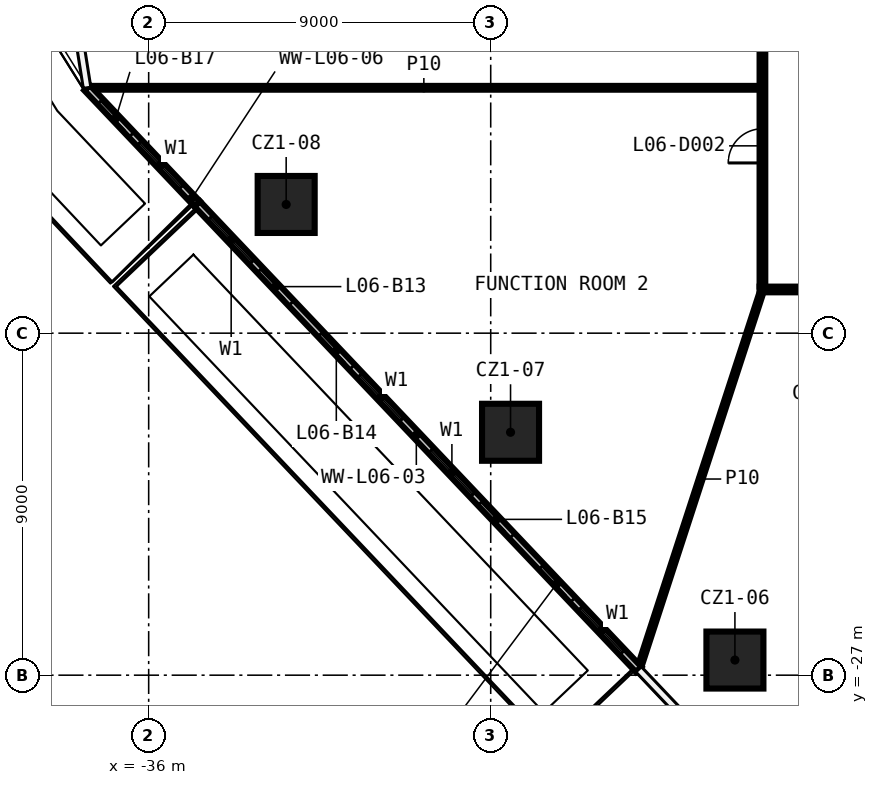
"""IFC4 building model, lengths in metres.
Left out: names, types, materials, properties, quantities, classifications, styles, units other than length and angle.
Written with IfcOpenShell. Run it as: python <this file> out.ifc"""

import sys

from ifc_helpers import new_model, si_unit, direction, frame, frame_2d, origin, origin_2d, place, context, subcontext, project, spatial, rectangle, extrude, element, fill, save


model = new_model("IFC4")
c1 = context("Model", 3, precision=1e-05, world=origin(), true_north=direction((0.0, 1.0)))
c2 = subcontext(c1, "Body", "Model", "MODEL_VIEW")
j1 = project(units=[si_unit("LENGTHUNIT", "METRE"), si_unit("PLANEANGLEUNIT", "RADIAN")], contexts=[c1])
p1 = place(None, origin())
s1 = spatial("IfcSite", under=j1, at=p1, CompositionType="ELEMENT")
p2 = place(p1, origin())
s2 = spatial("IfcBuilding", under=s1, at=p2, CompositionType="ELEMENT")
p3 = place(p2, frame((0.0, 0.0, 44.0)))
s3 = spatial("IfcBuildingStorey", under=s2, at=p3, CompositionType="ELEMENT", Elevation=44.0)
for number, where, z_axis, x_axis in (
    (1, (-20.574, -26.602, 0.0), (0.0, 0.0, 1.0), (1.0, 0.0, 0.0)),
    (2, (-26.478, -20.608, 0.0), (0.0, 0.0, 1.0), (1.0, 0.0, 0.0)),
    (3, (-32.382, -14.613, 0.0), (0.0, 0.0, 1.0), (1.0, 0.0, 0.0)),
):
    element("IfcColumn", number, at=place(p3, frame(where, z_axis=z_axis, x_axis=x_axis)), inside=s3, PredefinedType="COLUMN", context=c2, shape_type="SweptSolid", body=[
        extrude(rectangle(XDim=1.5, YDim=1.5, at=origin_2d()), origin(), (0.0, 0.0, 1.0), 3.3),
    ])
p4 = place(p3, frame((19.925, -16.85, 0.0), z_axis=(0.0, 0.0, 1.0), x_axis=(-1.0, 0.0, 0.0)))
e4 = element("IfcWall", 4, at=p4, inside=s3, PredefinedType="PARTITIONING", context=c2, shape_type="SweptSolid", body=[
    extrude(rectangle(XDim=39.85, YDim=0.15, at=frame_2d((19.925, 0.0))), origin(), (0.0, 0.0, 1.0), 3.3),
])
p5 = place(p4, frame((31.008, 0.0, 0.0)))
e5 = element("IfcOpeningElement", 5, at=p5, cuts=e4, PredefinedType="OPENING", context=c2, shape_type="SweptSolid", body=[
    extrude(rectangle(XDim=0.9, YDim=2.1, at=frame_2d((0.45, 1.05))), frame((0.0, 0.085, 0.0), z_axis=(0.0, -1.0, 0.0), x_axis=(1.0, 0.0, 0.0)), (0.0, 0.0, 1.0), 0.17),
])
p6 = place(p4, frame((22.704, 0.0, 0.0)))
e6 = element("IfcOpeningElement", 6, at=p6, cuts=e4, PredefinedType="OPENING", context=c2, shape_type="SweptSolid", body=[
    extrude(rectangle(XDim=0.9, YDim=2.1, at=frame_2d((0.45, 1.05))), frame((0.0, 0.085, 0.0), z_axis=(0.0, -1.0, 0.0), x_axis=(1.0, 0.0, 0.0)), (0.0, 0.0, 1.0), 0.17),
])
p7 = place(p4, frame((3.888, 0.0, 0.0)))
e7 = element("IfcOpeningElement", 7, at=p7, cuts=e4, PredefinedType="OPENING", context=c2, shape_type="SweptSolid", body=[
    extrude(rectangle(XDim=0.9, YDim=2.1, at=frame_2d((0.45, 1.05))), frame((0.0, 0.085, 0.0), z_axis=(0.0, -1.0, 0.0), x_axis=(1.0, 0.0, 0.0)), (0.0, 0.0, 1.0), 0.17),
])
p8 = place(p3, frame((-37.594, -11.543, 0.0), z_axis=(0.0, 0.0, 1.0), x_axis=(1.0, 0.0, 0.0)))
e8 = element("IfcWall", 8, at=p8, inside=s3, PredefinedType="PARTITIONING", context=c2, shape_type="SweptSolid", body=[
    extrude(rectangle(XDim=17.668, YDim=0.1, at=frame_2d((8.834, 0.0))), origin(), (0.0, 0.0, 1.0), 3.3),
])
p9 = place(p3, frame((-23.101, -26.826, 0.0), z_axis=(0.0, 0.0, 1.0), x_axis=(0.309854630824, 0.950783943784, 0.0)))
e9 = element("IfcWall", 9, at=p9, inside=s3, PredefinedType="PARTITIONING", context=c2, shape_type="SweptSolid", body=[
    extrude(rectangle(XDim=10.493, YDim=0.1, at=frame_2d((5.246, 0.0))), origin(), (0.0, 0.0, 1.0), 3.3),
])
p10 = place(p3, frame((-19.85, -16.775, 0.0), z_axis=(0.0, 0.0, 1.0), x_axis=(0.0, 1.0, 0.0)))
e10 = element("IfcWall", 10, at=p10, inside=s3, PredefinedType="PARTITIONING", context=c2, shape_type="SweptSolid", body=[
    extrude(rectangle(XDim=33.55, YDim=0.15, at=frame_2d((16.775, 0.0))), origin(), (0.0, 0.0, 1.0), 3.3),
])
p11 = place(p10, frame((12.256, 0.0, 0.0)))
e11 = element("IfcOpeningElement", 11, at=p11, cuts=e10, PredefinedType="OPENING", context=c2, shape_type="SweptSolid", body=[
    extrude(rectangle(XDim=0.9, YDim=2.1, at=frame_2d((0.45, 1.05))), frame((0.0, 0.085, 0.0), z_axis=(0.0, -1.0, 0.0), x_axis=(1.0, 0.0, 0.0)), (0.0, 0.0, 1.0), 0.17),
])
p12 = place(p10, frame((3.254, 0.0, 0.0)))
e12 = element("IfcOpeningElement", 12, at=p12, cuts=e10, PredefinedType="OPENING", context=c2, shape_type="SweptSolid", body=[
    extrude(rectangle(XDim=0.9, YDim=2.1, at=frame_2d((0.45, 1.05))), frame((0.0, 0.085, 0.0), z_axis=(0.0, -1.0, 0.0), x_axis=(1.0, 0.0, 0.0)), (0.0, 0.0, 1.0), 0.17),
])
p13 = place(p10, frame((27.451, 0.0, 0.0)))
e13 = element("IfcOpeningElement", 13, at=p13, cuts=e10, PredefinedType="OPENING", context=c2, shape_type="SweptSolid", body=[
    extrude(rectangle(XDim=0.9, YDim=2.1, at=frame_2d((0.45, 1.05))), frame((0.0, 0.085, 0.0), z_axis=(0.0, -1.0, 0.0), x_axis=(1.0, 0.0, 0.0)), (0.0, 0.0, 1.0), 0.17),
])
p14 = place(p3, frame((-34.724, -14.598, 0.0), z_axis=(0.0, 0.0, 1.0), x_axis=(0.688093946104, -0.725621610301, 0.0)))
e14 = element("IfcWall", 14, at=p14, inside=s3, PredefinedType="SOLIDWALL", context=c2, shape_type="SweptSolid", body=[
    extrude(rectangle(XDim=16.882, YDim=0.2, at=frame_2d((8.441, 0.0))), origin(), (0.0, 0.0, 1.0), 3.3),
])
p15 = place(p14, frame((0.5, 0.0, 0.6)))
e15 = element("IfcOpeningElement", 15, at=p15, cuts=e14, PredefinedType="OPENING", context=c2, shape_type="SweptSolid", body=[
    extrude(rectangle(XDim=1.6, YDim=2.4, at=frame_2d((0.8, 1.2))), frame((0.0, 0.11, 0.0), z_axis=(0.0, -1.0, 0.0), x_axis=(1.0, 0.0, 0.0)), (0.0, 0.0, 1.0), 0.22),
])
p16 = place(p14, frame((2.4, 0.0, 0.0)))
e16 = element("IfcOpeningElement", 16, at=p16, cuts=e14, PredefinedType="OPENING", context=c2, shape_type="SweptSolid", body=[
    extrude(rectangle(XDim=1.2, YDim=2.4, at=frame_2d((0.6, 1.2))), frame((0.0, 0.11, 0.0), z_axis=(0.0, -1.0, 0.0), x_axis=(1.0, 0.0, 0.0)), (0.0, 0.0, 1.0), 0.22),
])
p17 = place(p14, frame((6.22, 0.0, 0.6)))
e17 = element("IfcOpeningElement", 17, at=p17, cuts=e14, PredefinedType="OPENING", context=c2, shape_type="SweptSolid", body=[
    extrude(rectangle(XDim=1.6, YDim=2.4, at=frame_2d((0.8, 1.2))), frame((0.0, 0.11, 0.0), z_axis=(0.0, -1.0, 0.0), x_axis=(1.0, 0.0, 0.0)), (0.0, 0.0, 1.0), 0.22),
])
p18 = place(p14, frame((4.72, 0.0, 0.0)))
e18 = element("IfcOpeningElement", 18, at=p18, cuts=e14, PredefinedType="OPENING", context=c2, shape_type="SweptSolid", body=[
    extrude(rectangle(XDim=1.2, YDim=2.4, at=frame_2d((0.6, 1.2))), frame((0.0, 0.11, 0.0), z_axis=(0.0, -1.0, 0.0), x_axis=(1.0, 0.0, 0.0)), (0.0, 0.0, 1.0), 0.22),
])
p19 = place(p14, frame((8.941, 0.0, 0.6)))
e19 = element("IfcOpeningElement", 19, at=p19, cuts=e14, PredefinedType="OPENING", context=c2, shape_type="SweptSolid", body=[
    extrude(rectangle(XDim=1.6, YDim=2.4, at=frame_2d((0.8, 1.2))), frame((0.0, 0.11, 0.0), z_axis=(0.0, -1.0, 0.0), x_axis=(1.0, 0.0, 0.0)), (0.0, 0.0, 1.0), 0.22),
])
p20 = place(p14, frame((10.841, 0.0, 0.0)))
e20 = element("IfcOpeningElement", 20, at=p20, cuts=e14, PredefinedType="OPENING", context=c2, shape_type="SweptSolid", body=[
    extrude(rectangle(XDim=1.2, YDim=2.4, at=frame_2d((0.6, 1.2))), frame((0.0, 0.11, 0.0), z_axis=(0.0, -1.0, 0.0), x_axis=(1.0, 0.0, 0.0)), (0.0, 0.0, 1.0), 0.22),
])
p21 = place(p14, frame((14.662, 0.0, 0.6)))
e21 = element("IfcOpeningElement", 21, at=p21, cuts=e14, PredefinedType="OPENING", context=c2, shape_type="SweptSolid", body=[
    extrude(rectangle(XDim=1.6, YDim=2.4, at=frame_2d((0.8, 1.2))), frame((0.0, 0.11, 0.0), z_axis=(0.0, -1.0, 0.0), x_axis=(1.0, 0.0, 0.0)), (0.0, 0.0, 1.0), 0.22),
])
p22 = place(p14, frame((13.162, 0.0, 0.0)))
e22 = element("IfcOpeningElement", 22, at=p22, cuts=e14, PredefinedType="OPENING", context=c2, shape_type="SweptSolid", body=[
    extrude(rectangle(XDim=1.2, YDim=2.4, at=frame_2d((0.6, 1.2))), frame((0.0, 0.11, 0.0), z_axis=(0.0, -1.0, 0.0), x_axis=(1.0, 0.0, 0.0)), (0.0, 0.0, 1.0), 0.22),
])
p23 = place(p3, frame((-37.621, -11.543, 0.0), z_axis=(0.0, 0.0, 1.0), x_axis=(0.688100005166, -0.725615864553, 0.0)))
e23 = element("IfcWall", 23, at=p23, inside=s3, PredefinedType="SOLIDWALL", context=c2, shape_type="SweptSolid", body=[
    extrude(rectangle(XDim=4.21, YDim=0.2, at=frame_2d((2.105, 0.0))), origin(), (0.0, 0.0, 1.0), 3.3),
])
p24 = place(p23, frame((2.0, 0.0, 0.6)))
e24 = element("IfcOpeningElement", 24, at=p24, cuts=e23, PredefinedType="OPENING", context=c2, shape_type="SweptSolid", body=[
    extrude(rectangle(XDim=1.6, YDim=2.4, at=frame_2d((0.8, 1.2))), frame((0.0, 0.11, 0.0), z_axis=(0.0, -1.0, 0.0), x_axis=(1.0, 0.0, 0.0)), (0.0, 0.0, 1.0), 0.22),
])
p25 = place(p23, frame((0.5, 0.0, 0.0)))
e25 = element("IfcOpeningElement", 25, at=p25, cuts=e23, PredefinedType="OPENING", context=c2, shape_type="SweptSolid", body=[
    extrude(rectangle(XDim=1.2, YDim=2.4, at=frame_2d((0.6, 1.2))), frame((0.0, 0.11, 0.0), z_axis=(0.0, -1.0, 0.0), x_axis=(1.0, 0.0, 0.0)), (0.0, 0.0, 1.0), 0.22),
])
p26 = place(p12, origin())
e26 = element("IfcDoor", 26, at=p26, inside=s3, OperationType="SINGLE_SWING_LEFT", PredefinedType="DOOR", context=c2, shape_type="SweptSolid", body=[
    extrude(rectangle(XDim=0.9, YDim=2.1, at=frame_2d((0.45, 1.05))), frame((0.0, 0.025, 0.0), z_axis=(0.0, -1.0, 0.0), x_axis=(1.0, 0.0, 0.0)), (0.0, 0.0, 1.0), 0.05),
])
fill(e12, e26)
p27 = place(p15, origin())
e27 = element("IfcWindow", 27, at=p27, inside=s3, PartitioningType="SINGLE_PANEL", PredefinedType="WINDOW", context=c2, shape_type="SweptSolid", body=[
    extrude(rectangle(XDim=1.6, YDim=2.4, at=frame_2d((0.8, 1.2))), frame((0.0, 0.03, 0.0), z_axis=(0.0, -1.0, 0.0), x_axis=(1.0, 0.0, 0.0)), (0.0, 0.0, 1.0), 0.06),
])
fill(e15, e27)
p28 = place(p16, origin())
e28 = element("IfcDoor", 28, at=p28, inside=s3, OperationType="SLIDING_TO_LEFT", PredefinedType="DOOR", context=c2, shape_type="SweptSolid", body=[
    extrude(rectangle(XDim=1.2, YDim=2.4, at=frame_2d((0.6, 1.2))), frame((0.0, 0.025, 0.0), z_axis=(0.0, -1.0, 0.0), x_axis=(1.0, 0.0, 0.0)), (0.0, 0.0, 1.0), 0.05),
])
fill(e16, e28)
p29 = place(p17, origin())
e29 = element("IfcWindow", 29, at=p29, inside=s3, PartitioningType="SINGLE_PANEL", PredefinedType="WINDOW", context=c2, shape_type="SweptSolid", body=[
    extrude(rectangle(XDim=1.6, YDim=2.4, at=frame_2d((0.8, 1.2))), frame((0.0, 0.03, 0.0), z_axis=(0.0, -1.0, 0.0), x_axis=(1.0, 0.0, 0.0)), (0.0, 0.0, 1.0), 0.06),
])
fill(e17, e29)
p30 = place(p18, origin())
e30 = element("IfcDoor", 30, at=p30, inside=s3, OperationType="SLIDING_TO_LEFT", PredefinedType="DOOR", context=c2, shape_type="SweptSolid", body=[
    extrude(rectangle(XDim=1.2, YDim=2.4, at=frame_2d((0.6, 1.2))), frame((0.0, 0.025, 0.0), z_axis=(0.0, -1.0, 0.0), x_axis=(1.0, 0.0, 0.0)), (0.0, 0.0, 1.0), 0.05),
])
fill(e18, e30)
p31 = place(p19, origin())
e31 = element("IfcWindow", 31, at=p31, inside=s3, PartitioningType="SINGLE_PANEL", PredefinedType="WINDOW", context=c2, shape_type="SweptSolid", body=[
    extrude(rectangle(XDim=1.6, YDim=2.4, at=frame_2d((0.8, 1.2))), frame((0.0, 0.03, 0.0), z_axis=(0.0, -1.0, 0.0), x_axis=(1.0, 0.0, 0.0)), (0.0, 0.0, 1.0), 0.06),
])
fill(e19, e31)
p32 = place(p20, origin())
e32 = element("IfcDoor", 32, at=p32, inside=s3, OperationType="SLIDING_TO_LEFT", PredefinedType="DOOR", context=c2, shape_type="SweptSolid", body=[
    extrude(rectangle(XDim=1.2, YDim=2.4, at=frame_2d((0.6, 1.2))), frame((0.0, 0.025, 0.0), z_axis=(0.0, -1.0, 0.0), x_axis=(1.0, 0.0, 0.0)), (0.0, 0.0, 1.0), 0.05),
])
fill(e20, e32)
p33 = place(p21, origin())
e33 = element("IfcWindow", 33, at=p33, inside=s3, PartitioningType="SINGLE_PANEL", PredefinedType="WINDOW", context=c2, shape_type="SweptSolid", body=[
    extrude(rectangle(XDim=1.6, YDim=2.4, at=frame_2d((0.8, 1.2))), frame((0.0, 0.03, 0.0), z_axis=(0.0, -1.0, 0.0), x_axis=(1.0, 0.0, 0.0)), (0.0, 0.0, 1.0), 0.06),
])
fill(e21, e33)
p34 = place(p22, origin())
e34 = element("IfcDoor", 34, at=p34, inside=s3, OperationType="SLIDING_TO_LEFT", PredefinedType="DOOR", context=c2, shape_type="SweptSolid", body=[
    extrude(rectangle(XDim=1.2, YDim=2.4, at=frame_2d((0.6, 1.2))), frame((0.0, 0.025, 0.0), z_axis=(0.0, -1.0, 0.0), x_axis=(1.0, 0.0, 0.0)), (0.0, 0.0, 1.0), 0.05),
])
fill(e22, e34)
p35 = place(p24, origin())
e35 = element("IfcWindow", 35, at=p35, inside=s3, PartitioningType="SINGLE_PANEL", PredefinedType="WINDOW", context=c2, shape_type="SweptSolid", body=[
    extrude(rectangle(XDim=1.6, YDim=2.4, at=frame_2d((0.8, 1.2))), frame((0.0, 0.03, 0.0), z_axis=(0.0, -1.0, 0.0), x_axis=(1.0, 0.0, 0.0)), (0.0, 0.0, 1.0), 0.06),
])
fill(e24, e35)
p36 = place(p25, origin())
e36 = element("IfcDoor", 36, at=p36, inside=s3, OperationType="SLIDING_TO_LEFT", PredefinedType="DOOR", context=c2, shape_type="SweptSolid", body=[
    extrude(rectangle(XDim=1.2, YDim=2.4, at=frame_2d((0.6, 1.2))), frame((0.0, 0.025, 0.0), z_axis=(0.0, -1.0, 0.0), x_axis=(1.0, 0.0, 0.0)), (0.0, 0.0, 1.0), 0.05),
])
fill(e25, e36)
save(model, sys.argv[1])
